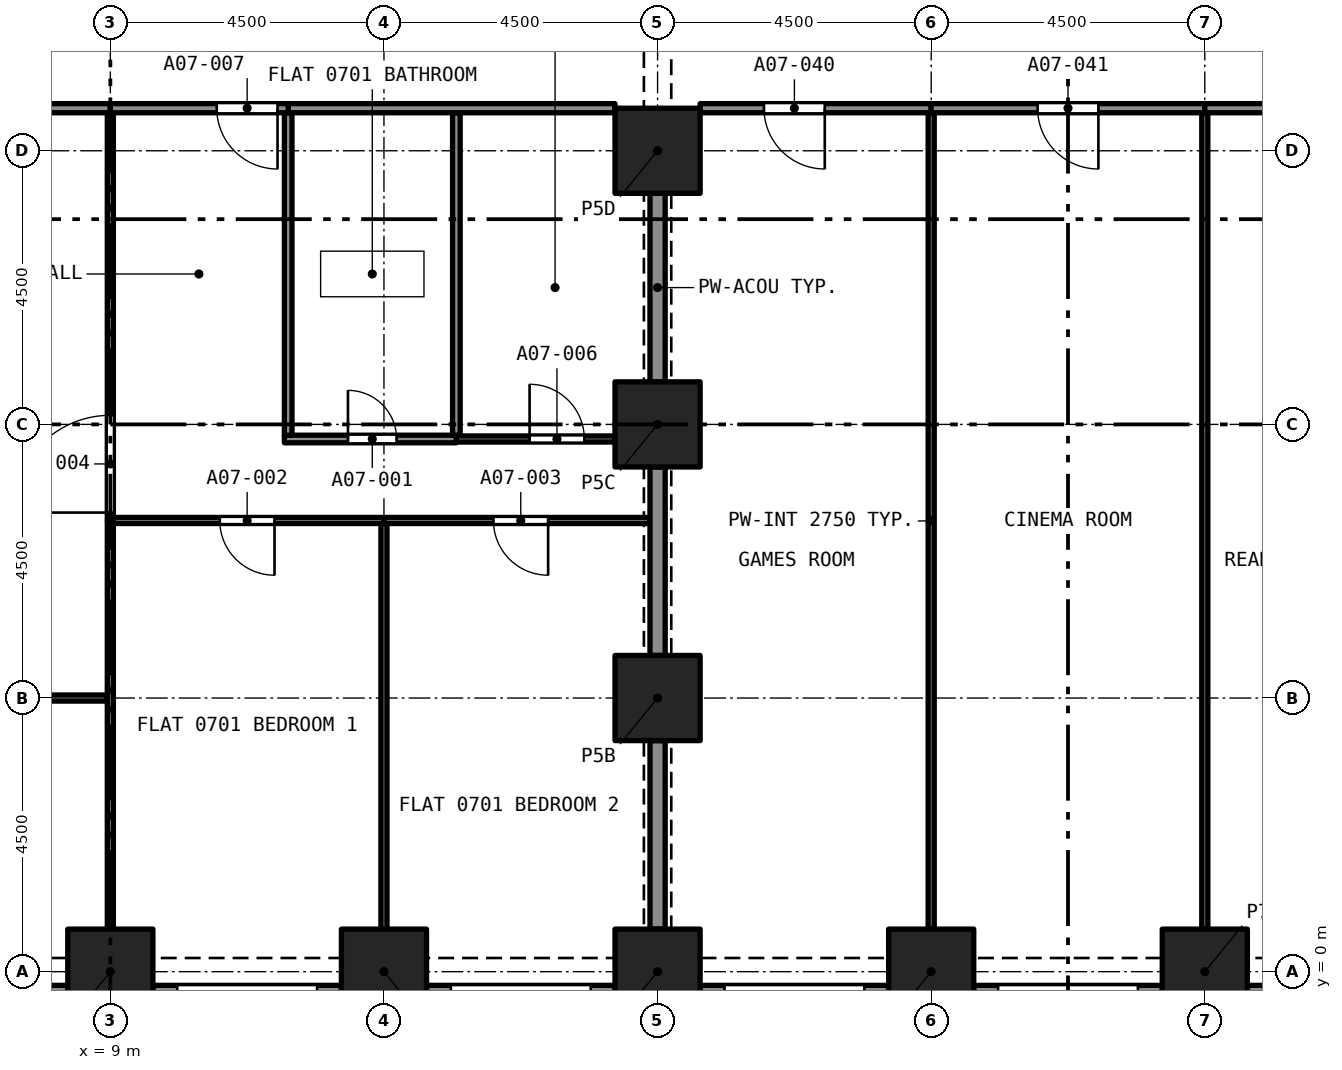
"""IFC4 building model, lengths in metres.
Left out: names, types, materials, properties, quantities, classifications, styles, units other than length and angle.
Written with IfcOpenShell. Run it as: python <this file> out.ifc"""

import sys

from ifc_helpers import new_model, si_unit, direction, frame, frame_2d, origin, origin_2d, place, context, subcontext, project, spatial, rectangle, extrude, element, fill, save


model = new_model("IFC4")
c1 = context("Model", 3, precision=1e-05, world=origin(), true_north=direction((0.0, 1.0)))
c2 = subcontext(c1, "Body", "Model", "MODEL_VIEW")
j1 = project(units=[si_unit("LENGTHUNIT", "METRE"), si_unit("PLANEANGLEUNIT", "RADIAN")], contexts=[c1])
p1 = place(None, origin())
s1 = spatial("IfcSite", under=j1, at=p1, CompositionType="ELEMENT")
p2 = place(p1, origin())
s2 = spatial("IfcBuilding", under=s1, at=p2, CompositionType="ELEMENT")
p3 = place(p2, frame((0.0, 0.0, 33.6)))
s3 = spatial("IfcBuildingStorey", under=s2, at=p3, CompositionType="ELEMENT", Elevation=33.6)
for number, where, z_axis, x_axis in (
    (1, (9.0, 0.0, 0.0), (0.0, 0.0, 1.0), (1.0, 0.0, 0.0)),
    (2, (13.5, 0.0, 0.0), (0.0, 0.0, 1.0), (1.0, 0.0, 0.0)),
    (3, (18.0, 0.0, 0.0), (0.0, 0.0, 1.0), (1.0, 0.0, 0.0)),
    (4, (22.5, 0.0, 0.0), (0.0, 0.0, 1.0), (1.0, 0.0, 0.0)),
    (5, (27.0, 0.0, 0.0), (0.0, 0.0, 1.0), (1.0, 0.0, 0.0)),
    (6, (18.0, 4.5, 0.0), (0.0, 0.0, 1.0), (1.0, 0.0, 0.0)),
    (7, (18.0, 9.0, 0.0), (0.0, 0.0, 1.0), (1.0, 0.0, 0.0)),
    (8, (18.0, 13.5, 0.0), (0.0, 0.0, 1.0), (1.0, 0.0, 0.0)),
):
    element("IfcColumn", number, at=place(p3, frame(where, z_axis=z_axis, x_axis=x_axis)), inside=s3, PredefinedType="COLUMN", context=c2, shape_type="SweptSolid", body=[
        extrude(rectangle(XDim=1.4, YDim=1.4, at=origin_2d()), origin(), (0.0, 0.0, 1.0), 3.2),
    ])
p4 = place(p3, frame((8.3, -0.375, 0.0), z_axis=(0.0, 0.0, 1.0), x_axis=(-1.0, 0.0, 0.0)))
e9 = element("IfcWall", 9, at=p4, inside=s3, PredefinedType="SOLIDWALL", context=c2, shape_type="SweptSolid", body=[
    extrude(rectangle(XDim=3.1, YDim=0.3, at=frame_2d((1.55, 0.0))), origin(), (0.0, 0.0, 1.0), 3.2),
])
p5 = place(p4, frame((0.4, 0.0, 0.45)))
e10 = element("IfcOpeningElement", 10, at=p5, cuts=e9, PredefinedType="OPENING", context=c2, shape_type="SweptSolid", body=[
    extrude(rectangle(XDim=2.3, YDim=1.95, at=frame_2d((1.15, 0.975))), frame((0.0, 0.16, 0.0), z_axis=(0.0, -1.0, 0.0), x_axis=(1.0, 0.0, 0.0)), (0.0, 0.0, 1.0), 0.32),
])
p6 = place(p3, frame((12.8, -0.375, 0.0), z_axis=(0.0, 0.0, 1.0), x_axis=(-1.0, 0.0, 0.0)))
e11 = element("IfcWall", 11, at=p6, inside=s3, PredefinedType="SOLIDWALL", context=c2, shape_type="SweptSolid", body=[
    extrude(rectangle(XDim=3.1, YDim=0.3, at=frame_2d((1.55, 0.0))), origin(), (0.0, 0.0, 1.0), 3.2),
])
p7 = place(p6, frame((0.4, 0.0, 0.45)))
e12 = element("IfcOpeningElement", 12, at=p7, cuts=e11, PredefinedType="OPENING", context=c2, shape_type="SweptSolid", body=[
    extrude(rectangle(XDim=2.3, YDim=1.95, at=frame_2d((1.15, 0.975))), frame((0.0, 0.16, 0.0), z_axis=(0.0, -1.0, 0.0), x_axis=(1.0, 0.0, 0.0)), (0.0, 0.0, 1.0), 0.32),
])
p8 = place(p3, frame((17.3, -0.375, 0.0), z_axis=(0.0, 0.0, 1.0), x_axis=(-1.0, 0.0, 0.0)))
e13 = element("IfcWall", 13, at=p8, inside=s3, PredefinedType="SOLIDWALL", context=c2, shape_type="SweptSolid", body=[
    extrude(rectangle(XDim=3.1, YDim=0.3, at=frame_2d((1.55, 0.0))), origin(), (0.0, 0.0, 1.0), 3.2),
])
p9 = place(p8, frame((0.4, 0.0, 0.45)))
e14 = element("IfcOpeningElement", 14, at=p9, cuts=e13, PredefinedType="OPENING", context=c2, shape_type="SweptSolid", body=[
    extrude(rectangle(XDim=2.3, YDim=1.95, at=frame_2d((1.15, 0.975))), frame((0.0, 0.16, 0.0), z_axis=(0.0, -1.0, 0.0), x_axis=(1.0, 0.0, 0.0)), (0.0, 0.0, 1.0), 0.32),
])
p10 = place(p3, frame((21.8, -0.375, 0.0), z_axis=(0.0, 0.0, 1.0), x_axis=(-1.0, 0.0, 0.0)))
e15 = element("IfcWall", 15, at=p10, inside=s3, PredefinedType="SOLIDWALL", context=c2, shape_type="SweptSolid", body=[
    extrude(rectangle(XDim=3.1, YDim=0.3, at=frame_2d((1.55, 0.0))), origin(), (0.0, 0.0, 1.0), 3.2),
])
p11 = place(p10, frame((0.4, 0.0, 0.45)))
e16 = element("IfcOpeningElement", 16, at=p11, cuts=e15, PredefinedType="OPENING", context=c2, shape_type="SweptSolid", body=[
    extrude(rectangle(XDim=2.3, YDim=1.95, at=frame_2d((1.15, 0.975))), frame((0.0, 0.16, 0.0), z_axis=(0.0, -1.0, 0.0), x_axis=(1.0, 0.0, 0.0)), (0.0, 0.0, 1.0), 0.32),
])
p12 = place(p3, frame((26.3, -0.375, 0.0), z_axis=(0.0, 0.0, 1.0), x_axis=(-1.0, 0.0, 0.0)))
e17 = element("IfcWall", 17, at=p12, inside=s3, PredefinedType="SOLIDWALL", context=c2, shape_type="SweptSolid", body=[
    extrude(rectangle(XDim=3.1, YDim=0.3, at=frame_2d((1.55, 0.0))), origin(), (0.0, 0.0, 1.0), 3.2),
])
p13 = place(p12, frame((0.4, 0.0, 0.45)))
e18 = element("IfcOpeningElement", 18, at=p13, cuts=e17, PredefinedType="OPENING", context=c2, shape_type="SweptSolid", body=[
    extrude(rectangle(XDim=2.3, YDim=1.95, at=frame_2d((1.15, 0.975))), frame((0.0, 0.16, 0.0), z_axis=(0.0, -1.0, 0.0), x_axis=(1.0, 0.0, 0.0)), (0.0, 0.0, 1.0), 0.32),
])
p14 = place(p3, frame((30.8, -0.375, 0.0), z_axis=(0.0, 0.0, 1.0), x_axis=(-1.0, 0.0, 0.0)))
e19 = element("IfcWall", 19, at=p14, inside=s3, PredefinedType="SOLIDWALL", context=c2, shape_type="SweptSolid", body=[
    extrude(rectangle(XDim=3.1, YDim=0.3, at=frame_2d((1.55, 0.0))), origin(), (0.0, 0.0, 1.0), 3.2),
])
p15 = place(p14, frame((0.4, 0.0, 0.45)))
e20 = element("IfcOpeningElement", 20, at=p15, cuts=e19, PredefinedType="OPENING", context=c2, shape_type="SweptSolid", body=[
    extrude(rectangle(XDim=2.3, YDim=1.95, at=frame_2d((1.15, 0.975))), frame((0.0, 0.16, 0.0), z_axis=(0.0, -1.0, 0.0), x_axis=(1.0, 0.0, 0.0)), (0.0, 0.0, 1.0), 0.32),
])
p16 = place(p3, frame((11.863, 8.76, 0.0), z_axis=(0.0, 0.0, 1.0), x_axis=(1.0, 0.0, 0.0)))
e21 = element("IfcWall", 21, at=p16, inside=s3, PredefinedType="PARTITIONING", context=c2, shape_type="SweptSolid", body=[
    extrude(rectangle(XDim=2.828, YDim=0.125, at=frame_2d((1.414, 0.0))), origin(), (0.0, 0.0, 1.0), 2.9),
])
p17 = place(p16, frame((1.045, 0.0, 0.0)))
e22 = element("IfcOpeningElement", 22, at=p17, cuts=e21, PredefinedType="OPENING", context=c2, shape_type="SweptSolid", body=[
    extrude(rectangle(XDim=0.8, YDim=2.1, at=frame_2d((0.4, 1.05))), frame((0.0, 0.073, 0.0), z_axis=(0.0, -1.0, 0.0), x_axis=(1.0, 0.0, 0.0)), (0.0, 0.0, 1.0), 0.145),
])
for number, where, z_axis, x_axis in (
    (23, (11.925, 8.823, 0.0), (0.0, 0.0, 1.0), (0.0, 1.0, 0.0)),
    (24, (14.691, 8.823, 0.0), (0.0, 0.0, 1.0), (0.0, 1.0, 0.0)),
):
    element("IfcWall", number, at=place(p3, frame(where, z_axis=z_axis, x_axis=x_axis)), inside=s3, PredefinedType="PARTITIONING", context=c2, shape_type="SweptSolid", body=[
        extrude(rectangle(XDim=5.302, YDim=0.125, at=frame_2d((2.651, 0.0))), origin(), (0.0, 0.0, 1.0), 2.9),
    ])
p18 = place(p3, frame((11.925, 14.2, 0.0), z_axis=(0.0, 0.0, 1.0), x_axis=(1.0, 0.0, 0.0)))
e25 = element("IfcWall", 25, at=p18, inside=s3, PredefinedType="PARTITIONING", context=c2, shape_type="SweptSolid", body=[
    extrude(rectangle(XDim=5.375, YDim=0.15, at=frame_2d((2.688, 0.0))), origin(), (0.0, 0.0, 1.0), 2.9),
])
p19 = place(p3, frame((13.5, 0.7, 0.0), z_axis=(0.0, 0.0, 1.0), x_axis=(0.0, 1.0, 0.0)))
e26 = element("IfcWall", 26, at=p19, inside=s3, PredefinedType="PARTITIONING", context=c2, shape_type="SweptSolid", body=[
    extrude(rectangle(XDim=6.67, YDim=0.1, at=frame_2d((3.335, 0.0))), origin(), (0.0, 0.0, 1.0), 2.9),
])
p20 = place(p3, frame((13.5, 7.42, 0.0), z_axis=(0.0, 0.0, 1.0), x_axis=(-1.0, 0.0, 0.0)))
e27 = element("IfcWall", 27, at=p20, inside=s3, PredefinedType="PARTITIONING", context=c2, shape_type="SweptSolid", body=[
    extrude(rectangle(XDim=4.45, YDim=0.1, at=frame_2d((2.225, 0.0))), origin(), (0.0, 0.0, 1.0), 2.9),
])
p21 = place(p20, frame((1.8, 0.0, 0.0)))
e28 = element("IfcOpeningElement", 28, at=p21, cuts=e27, PredefinedType="OPENING", context=c2, shape_type="SweptSolid", body=[
    extrude(rectangle(XDim=0.9, YDim=2.1, at=frame_2d((0.45, 1.05))), frame((0.0, 0.06, 0.0), z_axis=(0.0, -1.0, 0.0), x_axis=(1.0, 0.0, 0.0)), (0.0, 0.0, 1.0), 0.12),
])
p22 = place(p3, frame((9.0, 0.7, 0.0), z_axis=(0.0, 0.0, 1.0), x_axis=(0.0, 1.0, 0.0)))
e29 = element("IfcWall", 29, at=p22, inside=s3, PredefinedType="PARTITIONING", context=c2, shape_type="SweptSolid", body=[
    extrude(rectangle(XDim=6.72, YDim=0.1, at=frame_2d((3.36, 0.0))), origin(), (0.0, 0.0, 1.0), 2.9),
])
p23 = place(p3, frame((17.875, 7.42, 0.0), z_axis=(0.0, 0.0, 1.0), x_axis=(-1.0, 0.0, 0.0)))
e30 = element("IfcWall", 30, at=p23, inside=s3, PredefinedType="PARTITIONING", context=c2, shape_type="SweptSolid", body=[
    extrude(rectangle(XDim=4.375, YDim=0.1, at=frame_2d((2.188, 0.0))), origin(), (0.0, 0.0, 1.0), 2.9),
])
p24 = place(p23, frame((1.675, 0.0, 0.0)))
e31 = element("IfcOpeningElement", 31, at=p24, cuts=e30, PredefinedType="OPENING", context=c2, shape_type="SweptSolid", body=[
    extrude(rectangle(XDim=0.9, YDim=2.1, at=frame_2d((0.45, 1.05))), frame((0.0, 0.06, 0.0), z_axis=(0.0, -1.0, 0.0), x_axis=(1.0, 0.0, 0.0)), (0.0, 0.0, 1.0), 0.12),
])
for number, where, z_axis, x_axis in (
    (32, (18.0, 5.2, 0.0), (0.0, 0.0, 1.0), (0.0, 1.0, 0.0)),
    (33, (18.0, 0.7, 0.0), (0.0, 0.0, 1.0), (0.0, 1.0, 0.0)),
):
    element("IfcWall", number, at=place(p3, frame(where, z_axis=z_axis, x_axis=x_axis)), inside=s3, PredefinedType="PARTITIONING", context=c2, shape_type="SweptSolid", body=[
        extrude(rectangle(XDim=3.1, YDim=0.25, at=frame_2d((1.55, 0.0))), origin(), (0.0, 0.0, 1.0), 2.38),
    ])
p25 = place(p3, frame((9.0, 7.42, 0.0), z_axis=(0.0, 0.0, 1.0), x_axis=(0.0, 1.0, 0.0)))
e34 = element("IfcWall", 34, at=p25, inside=s3, PredefinedType="PARTITIONING", context=c2, shape_type="SweptSolid", body=[
    extrude(rectangle(XDim=6.705, YDim=0.1, at=frame_2d((3.353, 0.0))), origin(), (0.0, 0.0, 1.0), 2.9),
])
p26 = place(p25, frame((0.13, 0.0, 0.0)))
e35 = element("IfcOpeningElement", 35, at=p26, cuts=e34, PredefinedType="OPENING", context=c2, shape_type="SweptSolid", body=[
    extrude(rectangle(XDim=1.6, YDim=2.1, at=frame_2d((0.8, 1.05))), frame((0.0, 0.06, 0.0), z_axis=(0.0, -1.0, 0.0), x_axis=(1.0, 0.0, 0.0)), (0.0, 0.0, 1.0), 0.12),
])
p27 = place(p3, frame((0.758, 4.5, 0.0), z_axis=(0.0, 0.0, 1.0), x_axis=(1.0, 0.0, 0.0)))
e36 = element("IfcWall", 36, at=p27, inside=s3, PredefinedType="PARTITIONING", context=c2, shape_type="SweptSolid", body=[
    extrude(rectangle(XDim=8.192, YDim=0.1, at=frame_2d((4.096, 0.0))), origin(), (0.0, 0.0, 1.0), 2.9),
])
p28 = place(p27, frame((3.292, 0.0, 0.0)))
e37 = element("IfcOpeningElement", 37, at=p28, cuts=e36, PredefinedType="OPENING", context=c2, shape_type="SweptSolid", body=[
    extrude(rectangle(XDim=1.6, YDim=2.1, at=frame_2d((0.8, 1.05))), frame((0.0, 0.06, 0.0), z_axis=(0.0, -1.0, 0.0), x_axis=(1.0, 0.0, 0.0)), (0.0, 0.0, 1.0), 0.12),
])
p29 = place(p3, frame((0.7, 14.2, 0.0), z_axis=(0.0, 0.0, 1.0), x_axis=(1.0, 0.0, 0.0)))
e38 = element("IfcWall", 38, at=p29, inside=s3, PredefinedType="PARTITIONING", context=c2, shape_type="SweptSolid", body=[
    extrude(rectangle(XDim=8.3, YDim=0.15, at=frame_2d((4.15, 0.0))), origin(), (0.0, 0.0, 1.0), 2.9),
])
p30 = place(p3, frame((14.69, 8.76, 0.0), z_axis=(0.0, 0.0, 1.0), x_axis=(1.0, 0.0, 0.0)))
e39 = element("IfcWall", 39, at=p30, inside=s3, PredefinedType="PARTITIONING", context=c2, shape_type="SweptSolid", body=[
    extrude(rectangle(XDim=2.61, YDim=0.1, at=frame_2d((1.305, 0.0))), origin(), (0.0, 0.0, 1.0), 2.9),
])
p31 = place(p30, frame((1.205, 0.0, 0.0)))
e40 = element("IfcOpeningElement", 40, at=p31, cuts=e39, PredefinedType="OPENING", context=c2, shape_type="SweptSolid", body=[
    extrude(rectangle(XDim=0.9, YDim=2.1, at=frame_2d((0.45, 1.05))), frame((0.0, 0.06, 0.0), z_axis=(0.0, -1.0, 0.0), x_axis=(1.0, 0.0, 0.0)), (0.0, 0.0, 1.0), 0.12),
])
p32 = place(p3, frame((11.925, 14.2, 0.0), z_axis=(0.0, 0.0, 1.0), x_axis=(-1.0, 0.0, 0.0)))
e41 = element("IfcWall", 41, at=p32, inside=s3, PredefinedType="PARTITIONING", context=c2, shape_type="SweptSolid", body=[
    extrude(rectangle(XDim=2.925, YDim=0.15, at=frame_2d((1.462, 0.0))), origin(), (0.0, 0.0, 1.0), 2.9),
])
p33 = place(p32, frame((0.175, 0.0, 0.0)))
e42 = element("IfcOpeningElement", 42, at=p33, cuts=e41, PredefinedType="OPENING", context=c2, shape_type="SweptSolid", body=[
    extrude(rectangle(XDim=1.0, YDim=2.1, at=frame_2d((0.5, 1.05))), frame((0.0, 0.085, 0.0), z_axis=(0.0, -1.0, 0.0), x_axis=(1.0, 0.0, 0.0)), (0.0, 0.0, 1.0), 0.17),
])
p34 = place(p3, frame((18.0, 9.7, 0.0), z_axis=(0.0, 0.0, 1.0), x_axis=(0.0, 1.0, 0.0)))
e43 = element("IfcWall", 43, at=p34, inside=s3, PredefinedType="PARTITIONING", context=c2, shape_type="SweptSolid", body=[
    extrude(rectangle(XDim=3.1, YDim=0.25, at=frame_2d((1.55, 0.0))), origin(), (0.0, 0.0, 1.0), 2.38),
])
p35 = place(p3, frame((22.5, 0.7, 0.0), z_axis=(0.0, 0.0, 1.0), x_axis=(0.0, 1.0, 0.0)))
e44 = element("IfcWall", 44, at=p35, inside=s3, PredefinedType="PARTITIONING", context=c2, shape_type="SweptSolid", body=[
    extrude(rectangle(XDim=13.425, YDim=0.1, at=frame_2d((6.712, 0.0))), origin(), (0.0, 0.0, 1.0), 2.75),
])
p36 = place(p3, frame((22.5, 14.2, 0.0), z_axis=(0.0, 0.0, 1.0), x_axis=(-1.0, 0.0, 0.0)))
e45 = element("IfcWall", 45, at=p36, inside=s3, PredefinedType="PARTITIONING", context=c2, shape_type="SweptSolid", body=[
    extrude(rectangle(XDim=3.8, YDim=0.15, at=frame_2d((1.9, 0.0))), origin(), (0.0, 0.0, 1.0), 2.75),
])
p37 = place(p36, frame((1.75, 0.0, 0.0)))
e46 = element("IfcOpeningElement", 46, at=p37, cuts=e45, PredefinedType="OPENING", context=c2, shape_type="SweptSolid", body=[
    extrude(rectangle(XDim=1.0, YDim=2.1, at=frame_2d((0.5, 1.05))), frame((0.0, 0.085, 0.0), z_axis=(0.0, -1.0, 0.0), x_axis=(1.0, 0.0, 0.0)), (0.0, 0.0, 1.0), 0.17),
])
p38 = place(p3, frame((27.0, 0.7, 0.0), z_axis=(0.0, 0.0, 1.0), x_axis=(0.0, 1.0, 0.0)))
e47 = element("IfcWall", 47, at=p38, inside=s3, PredefinedType="PARTITIONING", context=c2, shape_type="SweptSolid", body=[
    extrude(rectangle(XDim=13.425, YDim=0.1, at=frame_2d((6.712, 0.0))), origin(), (0.0, 0.0, 1.0), 2.75),
])
p39 = place(p3, frame((27.0, 14.2, 0.0), z_axis=(0.0, 0.0, 1.0), x_axis=(-1.0, 0.0, 0.0)))
e48 = element("IfcWall", 48, at=p39, inside=s3, PredefinedType="PARTITIONING", context=c2, shape_type="SweptSolid", body=[
    extrude(rectangle(XDim=4.5, YDim=0.15, at=frame_2d((2.25, 0.0))), origin(), (0.0, 0.0, 1.0), 2.75),
])
p40 = place(p39, frame((1.75, 0.0, 0.0)))
e49 = element("IfcOpeningElement", 49, at=p40, cuts=e48, PredefinedType="OPENING", context=c2, shape_type="SweptSolid", body=[
    extrude(rectangle(XDim=1.0, YDim=2.1, at=frame_2d((0.5, 1.05))), frame((0.0, 0.085, 0.0), z_axis=(0.0, -1.0, 0.0), x_axis=(1.0, 0.0, 0.0)), (0.0, 0.0, 1.0), 0.17),
])
p41 = place(p3, frame((30.8, 14.2, 0.0), z_axis=(0.0, 0.0, 1.0), x_axis=(-1.0, 0.0, 0.0)))
e50 = element("IfcWall", 50, at=p41, inside=s3, PredefinedType="PARTITIONING", context=c2, shape_type="SweptSolid", body=[
    extrude(rectangle(XDim=3.8, YDim=0.15, at=frame_2d((1.9, 0.0))), origin(), (0.0, 0.0, 1.0), 2.75),
])
p42 = place(p41, frame((1.05, 0.0, 0.0)))
e51 = element("IfcOpeningElement", 51, at=p42, cuts=e50, PredefinedType="OPENING", context=c2, shape_type="SweptSolid", body=[
    extrude(rectangle(XDim=1.0, YDim=2.1, at=frame_2d((0.5, 1.05))), frame((0.0, 0.085, 0.0), z_axis=(0.0, -1.0, 0.0), x_axis=(1.0, 0.0, 0.0)), (0.0, 0.0, 1.0), 0.17),
])
p43 = place(p17, origin())
e52 = element("IfcDoor", 52, at=p43, inside=s3, OperationType="SINGLE_SWING_RIGHT", PredefinedType="DOOR", context=c2, shape_type="SweptSolid", body=[
    extrude(rectangle(XDim=0.8, YDim=2.1, at=frame_2d((0.4, 1.05))), frame((0.0, 0.025, 0.0), z_axis=(0.0, -1.0, 0.0), x_axis=(1.0, 0.0, 0.0)), (0.0, 0.0, 1.0), 0.05),
])
fill(e22, e52)
p44 = place(p21, origin())
e53 = element("IfcDoor", 53, at=p44, inside=s3, OperationType="SINGLE_SWING_RIGHT", PredefinedType="DOOR", context=c2, shape_type="SweptSolid", body=[
    extrude(rectangle(XDim=0.9, YDim=2.1, at=frame_2d((0.45, 1.05))), frame((0.0, 0.025, 0.0), z_axis=(0.0, -1.0, 0.0), x_axis=(1.0, 0.0, 0.0)), (0.0, 0.0, 1.0), 0.05),
])
fill(e28, e53)
p45 = place(p24, origin())
e54 = element("IfcDoor", 54, at=p45, inside=s3, OperationType="SINGLE_SWING_LEFT", PredefinedType="DOOR", context=c2, shape_type="SweptSolid", body=[
    extrude(rectangle(XDim=0.9, YDim=2.1, at=frame_2d((0.45, 1.05))), frame((0.0, 0.025, 0.0), z_axis=(0.0, -1.0, 0.0), x_axis=(1.0, 0.0, 0.0)), (0.0, 0.0, 1.0), 0.05),
])
fill(e31, e54)
p46 = place(p26, origin())
e55 = element("IfcDoor", 55, at=p46, inside=s3, OperationType="SINGLE_SWING_LEFT", PredefinedType="DOOR", context=c2, shape_type="SweptSolid", body=[
    extrude(rectangle(XDim=1.6, YDim=2.1, at=frame_2d((0.8, 1.05))), frame((0.0, 0.025, 0.0), z_axis=(0.0, -1.0, 0.0), x_axis=(1.0, 0.0, 0.0)), (0.0, 0.0, 1.0), 0.05),
])
fill(e35, e55)
p47 = place(p31, origin())
e56 = element("IfcDoor", 56, at=p47, inside=s3, OperationType="SINGLE_SWING_RIGHT", PredefinedType="DOOR", context=c2, shape_type="SweptSolid", body=[
    extrude(rectangle(XDim=0.9, YDim=2.1, at=frame_2d((0.45, 1.05))), frame((0.0, 0.025, 0.0), z_axis=(0.0, -1.0, 0.0), x_axis=(1.0, 0.0, 0.0)), (0.0, 0.0, 1.0), 0.05),
])
fill(e40, e56)
p48 = place(p33, origin())
e57 = element("IfcDoor", 57, at=p48, inside=s3, OperationType="SINGLE_SWING_LEFT", PredefinedType="DOOR", context=c2, shape_type="SweptSolid", body=[
    extrude(rectangle(XDim=1.0, YDim=2.1, at=frame_2d((0.5, 1.05))), frame((0.0, 0.025, 0.0), z_axis=(0.0, -1.0, 0.0), x_axis=(1.0, 0.0, 0.0)), (0.0, 0.0, 1.0), 0.05),
])
fill(e42, e57)
p49 = place(p37, origin())
e58 = element("IfcDoor", 58, at=p49, inside=s3, OperationType="SINGLE_SWING_RIGHT", PredefinedType="DOOR", context=c2, shape_type="SweptSolid", body=[
    extrude(rectangle(XDim=1.0, YDim=2.1, at=frame_2d((0.5, 1.05))), frame((0.0, 0.025, 0.0), z_axis=(0.0, -1.0, 0.0), x_axis=(1.0, 0.0, 0.0)), (0.0, 0.0, 1.0), 0.05),
])
fill(e46, e58)
p50 = place(p40, origin())
e59 = element("IfcDoor", 59, at=p50, inside=s3, OperationType="SINGLE_SWING_RIGHT", PredefinedType="DOOR", context=c2, shape_type="SweptSolid", body=[
    extrude(rectangle(XDim=1.0, YDim=2.1, at=frame_2d((0.5, 1.05))), frame((0.0, 0.025, 0.0), z_axis=(0.0, -1.0, 0.0), x_axis=(1.0, 0.0, 0.0)), (0.0, 0.0, 1.0), 0.05),
])
fill(e49, e59)
save(model, sys.argv[1])
